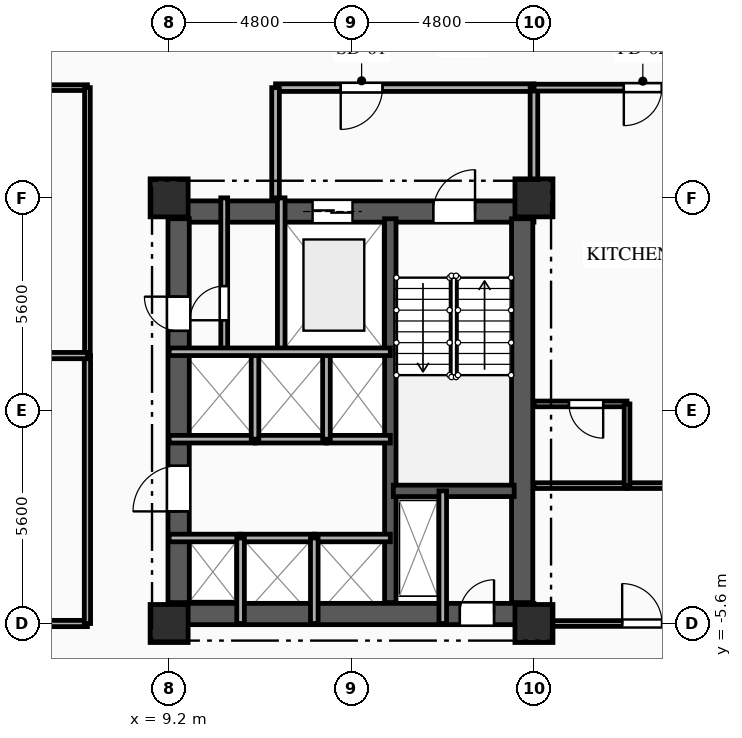
"""IFC4 building model, lengths in metres.
Left out: names, types, materials, properties, quantities, classifications, styles, units other than length and angle.
Written with IfcOpenShell. Run it as: python <this file> out.ifc"""

import sys

from ifc_helpers import new_model, si_unit, direction, frame, frame_2d, origin, origin_2d, place, context, subcontext, project, spatial, rectangle, extrude, element, fill, save


model = new_model("IFC4")
c1 = context("Model", 3, precision=1e-05, world=origin(), true_north=direction((0.0, 1.0)))
c2 = subcontext(c1, "Body", "Model", "MODEL_VIEW")
j1 = project(units=[si_unit("LENGTHUNIT", "METRE"), si_unit("PLANEANGLEUNIT", "RADIAN")], contexts=[c1])
p1 = place(None, origin())
s1 = spatial("IfcSite", under=j1, at=p1, CompositionType="ELEMENT")
p2 = place(p1, origin())
s2 = spatial("IfcBuilding", under=s1, at=p2, CompositionType="ELEMENT")
p3 = place(p2, frame((0.0, 0.0, 99.1)))
s3 = spatial("IfcBuildingStorey", under=s2, at=p3, CompositionType="ELEMENT", Elevation=99.1)
for number, where, z_axis, x_axis in (
    (1, (9.2, -5.6, 0.0), (0.0, 0.0, 1.0), (1.0, 0.0, 0.0)),
    (2, (9.2, 5.6, 0.0), (0.0, 0.0, 1.0), (1.0, 0.0, 0.0)),
    (3, (18.8, -5.6, 0.0), (0.0, 0.0, 1.0), (1.0, 0.0, 0.0)),
    (4, (18.8, 5.6, 0.0), (0.0, 0.0, 1.0), (1.0, 0.0, 0.0)),
):
    element("IfcColumn", number, at=place(p3, frame(where, z_axis=z_axis, x_axis=x_axis)), inside=s3, PredefinedType="COLUMN", context=c2, shape_type="SweptSolid", body=[
        extrude(rectangle(XDim=1.0, YDim=1.0, at=origin_2d()), origin(), (0.0, 0.0, 1.0), 3.35),
    ])
p4 = place(p3, frame((9.2, 5.24, 0.0), z_axis=(0.0, 0.0, 1.0), x_axis=(1.0, 0.0, 0.0)))
e5 = element("IfcWall", 5, at=p4, inside=s3, PredefinedType="SHEAR", context=c2, shape_type="SweptSolid", body=[
    extrude(rectangle(XDim=9.6, YDim=0.56, at=frame_2d((4.8, 0.0))), origin(), (0.0, 0.0, 1.0), 3.045),
])
p5 = place(p4, frame((6.95, 0.0, 0.0)))
e6 = element("IfcOpeningElement", 6, at=p5, cuts=e5, PredefinedType="OPENING", context=c2, shape_type="SweptSolid", body=[
    extrude(rectangle(XDim=1.1, YDim=2.15, at=frame_2d((0.55, 1.075))), frame((0.0, 0.29, 0.0), z_axis=(0.0, -1.0, 0.0), x_axis=(1.0, 0.0, 0.0)), (0.0, 0.0, 1.0), 0.58),
])
p6 = place(p4, frame((3.775, 0.0, 0.0)))
e7 = element("IfcOpeningElement", 7, at=p6, cuts=e5, PredefinedType="OPENING", context=c2, shape_type="SweptSolid", body=[
    extrude(rectangle(XDim=1.05, YDim=2.1, at=frame_2d((0.525, 1.05))), frame((0.0, 0.29, 0.0), z_axis=(0.0, -1.0, 0.0), x_axis=(1.0, 0.0, 0.0)), (0.0, 0.0, 1.0), 0.58),
])
p7 = place(p3, frame((9.2, -5.35, 0.0), z_axis=(0.0, 0.0, 1.0), x_axis=(1.0, 0.0, 0.0)))
e8 = element("IfcWall", 8, at=p7, inside=s3, PredefinedType="SHEAR", context=c2, shape_type="SweptSolid", body=[
    extrude(rectangle(XDim=9.6, YDim=0.56, at=frame_2d((4.8, 0.0))), origin(), (0.0, 0.0, 1.0), 3.045),
])
p8 = place(p7, frame((7.65, 0.0, 0.0)))
e9 = element("IfcOpeningElement", 9, at=p8, cuts=e8, PredefinedType="OPENING", context=c2, shape_type="SweptSolid", body=[
    extrude(rectangle(XDim=0.9, YDim=2.1, at=frame_2d((0.45, 1.05))), frame((0.0, 0.29, 0.0), z_axis=(0.0, -1.0, 0.0), x_axis=(1.0, 0.0, 0.0)), (0.0, 0.0, 1.0), 0.58),
])
p9 = place(p3, frame((9.45, -5.05, 0.0), z_axis=(0.0, 0.0, 1.0), x_axis=(0.0, 1.0, 0.0)))
e10 = element("IfcWall", 10, at=p9, inside=s3, PredefinedType="SHEAR", context=c2, shape_type="SweptSolid", body=[
    extrude(rectangle(XDim=10.1, YDim=0.56, at=frame_2d((5.05, 0.0))), origin(), (0.0, 0.0, 1.0), 3.045),
])
p10 = place(p9, frame((7.15, 0.0, 0.0)))
e11 = element("IfcOpeningElement", 11, at=p10, cuts=e10, PredefinedType="OPENING", context=c2, shape_type="SweptSolid", body=[
    extrude(rectangle(XDim=0.9, YDim=2.1, at=frame_2d((0.45, 1.05))), frame((0.0, 0.29, 0.0), z_axis=(0.0, -1.0, 0.0), x_axis=(1.0, 0.0, 0.0)), (0.0, 0.0, 1.0), 0.58),
])
p11 = place(p9, frame((2.4, 0.0, 0.0)))
e12 = element("IfcOpeningElement", 12, at=p11, cuts=e10, PredefinedType="OPENING", context=c2, shape_type="SweptSolid", body=[
    extrude(rectangle(XDim=1.2, YDim=2.15, at=frame_2d((0.6, 1.075))), frame((0.0, 0.29, 0.0), z_axis=(0.0, -1.0, 0.0), x_axis=(1.0, 0.0, 0.0)), (0.0, 0.0, 1.0), 0.58),
])
p12 = place(p3, frame((18.49, -5.05, 0.0), z_axis=(0.0, 0.0, 1.0), x_axis=(0.0, 1.0, 0.0)))
e13 = element("IfcWall", 13, at=p12, inside=s3, PredefinedType="SHEAR", context=c2, shape_type="SweptSolid", body=[
    extrude(rectangle(XDim=10.1, YDim=0.56, at=frame_2d((5.05, 0.0))), origin(), (0.0, 0.0, 1.0), 3.045),
])
p13 = place(p3, frame((15.02, -5.05, 0.0), z_axis=(0.0, 0.0, 1.0), x_axis=(0.0, 1.0, 0.0)))
e14 = element("IfcWall", 14, at=p13, inside=s3, PredefinedType="SHEAR", context=c2, shape_type="SweptSolid", body=[
    extrude(rectangle(XDim=10.1, YDim=0.3, at=frame_2d((5.05, 0.0))), origin(), (0.0, 0.0, 1.0), 3.045),
])
p14 = place(p3, frame((15.1, -2.11, 0.0), z_axis=(0.0, 0.0, 1.0), x_axis=(1.0, 0.0, 0.0)))
e15 = element("IfcWall", 15, at=p14, inside=s3, PredefinedType="SHEAR", context=c2, shape_type="SweptSolid", body=[
    extrude(rectangle(XDim=3.18, YDim=0.3, at=frame_2d((1.59, 0.0))), origin(), (0.0, 0.0, 1.0), 3.045),
])
p15 = place(p3, frame((16.4, -2.11, 0.0), z_axis=(0.0, 0.0, 1.0), x_axis=(0.0, -1.0, 0.0)))
e16 = element("IfcWall", 16, at=p15, inside=s3, PredefinedType="PARTITIONING", context=c2, shape_type="SweptSolid", body=[
    extrude(rectangle(XDim=3.49, YDim=0.2, at=frame_2d((1.745, 0.0))), origin(), (0.0, 0.0, 1.0), 3.045),
])
p16 = place(p3, frame((12.15, 5.6, 0.0), z_axis=(0.0, 0.0, 1.0), x_axis=(0.0, -1.0, 0.0)))
e17 = element("IfcWall", 17, at=p16, inside=s3, PredefinedType="PARTITIONING", context=c2, shape_type="SweptSolid", body=[
    extrude(rectangle(XDim=4.05, YDim=0.2, at=frame_2d((2.025, 0.0))), origin(), (0.0, 0.0, 1.0), 3.045),
])
p17 = place(p3, frame((18.8, 8.5, 0.0), z_axis=(0.0, 0.0, 1.0), x_axis=(-1.0, 0.0, 0.0)))
e18 = element("IfcWall", 18, at=p17, inside=s3, PredefinedType="PARTITIONING", context=c2, shape_type="SweptSolid", body=[
    extrude(rectangle(XDim=6.8, YDim=0.2, at=frame_2d((3.4, 0.0))), origin(), (0.0, 0.0, 1.0), 3.045),
])
p18 = place(p17, frame((3.985, 0.0, 0.0)))
e19 = element("IfcOpeningElement", 19, at=p18, cuts=e18, PredefinedType="OPENING", context=c2, shape_type="SweptSolid", body=[
    extrude(rectangle(XDim=1.1, YDim=2.15, at=frame_2d((0.55, 1.075))), frame((0.0, 0.11, 0.0), z_axis=(0.0, -1.0, 0.0), x_axis=(1.0, 0.0, 0.0)), (0.0, 0.0, 1.0), 0.22),
])
p19 = place(p3, frame((12.0, 8.5, 0.0), z_axis=(0.0, 0.0, 1.0), x_axis=(0.0, -1.0, 0.0)))
e20 = element("IfcWall", 20, at=p19, inside=s3, PredefinedType="PARTITIONING", context=c2, shape_type="SweptSolid", body=[
    extrude(rectangle(XDim=2.9, YDim=0.2, at=frame_2d((1.45, 0.0))), origin(), (0.0, 0.0, 1.0), 3.045),
])
p20 = place(p3, frame((18.8, 5.6, 0.0), z_axis=(0.0, 0.0, 1.0), x_axis=(0.0, 1.0, 0.0)))
e21 = element("IfcWall", 21, at=p20, inside=s3, PredefinedType="PARTITIONING", context=c2, shape_type="SweptSolid", body=[
    extrude(rectangle(XDim=2.9, YDim=0.2, at=frame_2d((1.45, 0.0))), origin(), (0.0, 0.0, 1.0), 2.53),
])
p21 = place(p3, frame((10.65, 1.55, 0.0), z_axis=(0.0, 0.0, 1.0), x_axis=(0.0, 1.0, 0.0)))
e22 = element("IfcWall", 22, at=p21, inside=s3, PredefinedType="PARTITIONING", context=c2, shape_type="SweptSolid", body=[
    extrude(rectangle(XDim=4.05, YDim=0.18, at=frame_2d((2.025, 0.0))), origin(), (0.0, 0.0, 1.0), 3.045),
])
p22 = place(p21, frame((0.829, 0.0, 0.0)))
e23 = element("IfcOpeningElement", 23, at=p22, cuts=e22, PredefinedType="OPENING", context=c2, shape_type="SweptSolid", body=[
    extrude(rectangle(XDim=0.9, YDim=2.1, at=frame_2d((0.45, 1.05))), frame((0.0, 0.1, 0.0), z_axis=(0.0, -1.0, 0.0), x_axis=(1.0, 0.0, 0.0)), (0.0, 0.0, 1.0), 0.2),
])
p23 = place(p3, frame((9.2, -3.35, 0.0), z_axis=(0.0, 0.0, 1.0), x_axis=(1.0, 0.0, 0.0)))
e24 = element("IfcWall", 24, at=p23, inside=s3, PredefinedType="PARTITIONING", context=c2, shape_type="SweptSolid", body=[
    extrude(rectangle(XDim=1.88, YDim=0.2, at=frame_2d((0.94, 0.0))), origin(), (0.0, 0.0, 1.0), 2.76),
])
p24 = place(p3, frame((11.08, -3.35, 0.0), z_axis=(0.0, 0.0, 1.0), x_axis=(1.0, 0.0, 0.0)))
e25 = element("IfcWall", 25, at=p24, inside=s3, PredefinedType="PARTITIONING", context=c2, shape_type="SweptSolid", body=[
    extrude(rectangle(XDim=1.94, YDim=0.2, at=frame_2d((0.97, 0.0))), origin(), (0.0, 0.0, 1.0), 3.045),
])
p25 = place(p3, frame((13.02, -3.35, 0.0), z_axis=(0.0, 0.0, 1.0), x_axis=(1.0, 0.0, 0.0)))
e26 = element("IfcWall", 26, at=p25, inside=s3, PredefinedType="PARTITIONING", context=c2, shape_type="SweptSolid", body=[
    extrude(rectangle(XDim=2.0, YDim=0.2, at=frame_2d((1.0, 0.0))), origin(), (0.0, 0.0, 1.0), 3.045),
])
p26 = place(p3, frame((11.46, -0.75, 0.0), z_axis=(0.0, 0.0, 1.0), x_axis=(-1.0, 0.0, 0.0)))
e27 = element("IfcWall", 27, at=p26, inside=s3, PredefinedType="PARTITIONING", context=c2, shape_type="SweptSolid", body=[
    extrude(rectangle(XDim=2.26, YDim=0.2, at=frame_2d((1.13, 0.0))), origin(), (0.0, 0.0, 1.0), 3.045),
])
p27 = place(p3, frame((13.34, -0.75, 0.0), z_axis=(0.0, 0.0, 1.0), x_axis=(-1.0, 0.0, 0.0)))
e28 = element("IfcWall", 28, at=p27, inside=s3, PredefinedType="PARTITIONING", context=c2, shape_type="SweptSolid", body=[
    extrude(rectangle(XDim=1.88, YDim=0.2, at=frame_2d((0.94, 0.0))), origin(), (0.0, 0.0, 1.0), 3.045),
])
p28 = place(p3, frame((15.02, -0.75, 0.0), z_axis=(0.0, 0.0, 1.0), x_axis=(-1.0, 0.0, 0.0)))
e29 = element("IfcWall", 29, at=p28, inside=s3, PredefinedType="PARTITIONING", context=c2, shape_type="SweptSolid", body=[
    extrude(rectangle(XDim=1.68, YDim=0.2, at=frame_2d((0.84, 0.0))), origin(), (0.0, 0.0, 1.0), 3.045),
])
for number, where, z_axis, x_axis in (
    (30, (11.08, -5.6, 0.0), (0.0, 0.0, 1.0), (0.0, 1.0, 0.0)),
    (31, (13.02, -5.6, 0.0), (0.0, 0.0, 1.0), (0.0, 1.0, 0.0)),
):
    element("IfcWall", number, at=place(p3, frame(where, z_axis=z_axis, x_axis=x_axis)), inside=s3, PredefinedType="PARTITIONING", context=c2, shape_type="SweptSolid", body=[
        extrude(rectangle(XDim=2.25, YDim=0.2, at=frame_2d((1.125, 0.0))), origin(), (0.0, 0.0, 1.0), 3.045),
    ])
for number, where, z_axis, x_axis in (
    (32, (11.46, -0.75, 0.0), (0.0, 0.0, 1.0), (0.0, 1.0, 0.0)),
    (33, (13.34, -0.75, 0.0), (0.0, 0.0, 1.0), (0.0, 1.0, 0.0)),
):
    element("IfcWall", number, at=place(p3, frame(where, z_axis=z_axis, x_axis=x_axis)), inside=s3, PredefinedType="PARTITIONING", context=c2, shape_type="SweptSolid", body=[
        extrude(rectangle(XDim=2.3, YDim=0.2, at=frame_2d((1.15, 0.0))), origin(), (0.0, 0.0, 1.0), 3.045),
    ])
p29 = place(p3, frame((23.0, 8.5, 0.0), z_axis=(0.0, 0.0, 1.0), x_axis=(-1.0, 0.0, 0.0)))
e34 = element("IfcWall", 34, at=p29, inside=s3, PredefinedType="PARTITIONING", context=c2, shape_type="SweptSolid", body=[
    extrude(rectangle(XDim=4.2, YDim=0.18, at=frame_2d((2.1, 0.0))), origin(), (0.0, 0.0, 1.0), 3.045),
])
p30 = place(p29, frame((0.835, 0.0, 0.0)))
e35 = element("IfcOpeningElement", 35, at=p30, cuts=e34, PredefinedType="OPENING", context=c2, shape_type="SweptSolid", body=[
    extrude(rectangle(XDim=1.0, YDim=2.15, at=frame_2d((0.5, 1.075))), frame((0.0, 0.1, 0.0), z_axis=(0.0, -1.0, 0.0), x_axis=(1.0, 0.0, 0.0)), (0.0, 0.0, 1.0), 0.2),
])
p31 = place(p3, frame((7.05, 8.5, 0.0), z_axis=(0.0, 0.0, 1.0), x_axis=(-1.0, 0.0, 0.0)))
e36 = element("IfcWall", 36, at=p31, inside=s3, PredefinedType="PARTITIONING", context=c2, shape_type="SweptSolid", body=[
    extrude(rectangle(XDim=7.05, YDim=0.15, at=frame_2d((3.525, 0.0))), origin(), (0.0, 0.0, 1.0), 3.045),
])
p32 = place(p3, frame((18.8, -5.6, 0.0), z_axis=(0.0, 0.0, 1.0), x_axis=(1.0, 0.0, 0.0)))
e37 = element("IfcWall", 37, at=p32, inside=s3, PredefinedType="PARTITIONING", context=c2, shape_type="SweptSolid", body=[
    extrude(rectangle(XDim=4.2, YDim=0.15, at=frame_2d((2.1, 0.0))), origin(), (0.0, 0.0, 1.0), 2.53),
])
p33 = place(p32, frame((2.321, 0.0, 0.0)))
e38 = element("IfcOpeningElement", 38, at=p33, cuts=e37, PredefinedType="OPENING", context=c2, shape_type="SweptSolid", body=[
    extrude(rectangle(XDim=1.05, YDim=2.15, at=frame_2d((0.525, 1.075))), frame((0.0, 0.085, 0.0), z_axis=(0.0, -1.0, 0.0), x_axis=(1.0, 0.0, 0.0)), (0.0, 0.0, 1.0), 0.17),
])
p34 = place(p3, frame((0.0, -5.6, 0.0), z_axis=(0.0, 0.0, 1.0), x_axis=(1.0, 0.0, 0.0)))
e39 = element("IfcWall", 39, at=p34, inside=s3, PredefinedType="PARTITIONING", context=c2, shape_type="SweptSolid", body=[
    extrude(rectangle(XDim=7.05, YDim=0.165, at=frame_2d((3.525, 0.0))), origin(), (0.0, 0.0, 1.0), 2.53),
])
p35 = place(p3, frame((7.05, -5.6, 0.0), z_axis=(0.0, 0.0, 1.0), x_axis=(0.0, 1.0, 0.0)))
e40 = element("IfcWall", 40, at=p35, inside=s3, PredefinedType="PARTITIONING", context=c2, shape_type="SweptSolid", body=[
    extrude(rectangle(XDim=7.05, YDim=0.165, at=frame_2d((3.525, 0.0))), origin(), (0.0, 0.0, 1.0), 3.045),
])
p36 = place(p3, frame((7.05, 1.45, 0.0), z_axis=(0.0, 0.0, 1.0), x_axis=(0.0, 1.0, 0.0)))
e41 = element("IfcWall", 41, at=p36, inside=s3, PredefinedType="PARTITIONING", context=c2, shape_type="SweptSolid", body=[
    extrude(rectangle(XDim=7.05, YDim=0.15, at=frame_2d((3.525, 0.0))), origin(), (0.0, 0.0, 1.0), 3.045),
])
p37 = place(p3, frame((21.25, -1.972, 0.0), z_axis=(0.0, 0.0, 1.0), x_axis=(1.0, 0.0, 0.0)))
e42 = element("IfcWall", 42, at=p37, inside=s3, PredefinedType="PARTITIONING", context=c2, shape_type="SweptSolid", body=[
    extrude(rectangle(XDim=4.586, YDim=0.15, at=frame_2d((2.293, 0.0))), origin(), (0.0, 0.0, 1.0), 3.045),
])
p38 = place(p3, frame((18.8, -1.972, 0.0), z_axis=(0.0, 0.0, 1.0), x_axis=(1.0, 0.0, 0.0)))
e43 = element("IfcWall", 43, at=p38, inside=s3, PredefinedType="PLUMBINGWALL", context=c2, shape_type="SweptSolid", body=[
    extrude(rectangle(XDim=2.45, YDim=0.15, at=frame_2d((1.225, 0.0))), origin(), (0.0, 0.0, 1.0), 2.53),
])
p39 = place(p3, frame((21.25, 0.178, 0.0), z_axis=(0.0, 0.0, 1.0), x_axis=(-1.0, 0.0, 0.0)))
e44 = element("IfcWall", 44, at=p39, inside=s3, PredefinedType="PLUMBINGWALL", context=c2, shape_type="SweptSolid", body=[
    extrude(rectangle(XDim=2.45, YDim=0.15, at=frame_2d((1.225, 0.0))), origin(), (0.0, 0.0, 1.0), 3.045),
])
p40 = place(p39, frame((0.629, 0.0, 0.0)))
e45 = element("IfcOpeningElement", 45, at=p40, cuts=e44, PredefinedType="OPENING", context=c2, shape_type="SweptSolid", body=[
    extrude(rectangle(XDim=0.9, YDim=2.1, at=frame_2d((0.45, 1.05))), frame((0.0, 0.085, 0.0), z_axis=(0.0, -1.0, 0.0), x_axis=(1.0, 0.0, 0.0)), (0.0, 0.0, 1.0), 0.17),
])
p41 = place(p3, frame((21.25, -1.972, 0.0), z_axis=(0.0, 0.0, 1.0), x_axis=(0.0, 1.0, 0.0)))
e46 = element("IfcWall", 46, at=p41, inside=s3, PredefinedType="PLUMBINGWALL", context=c2, shape_type="SweptSolid", body=[
    extrude(rectangle(XDim=2.15, YDim=0.15, at=frame_2d((1.075, 0.0))), origin(), (0.0, 0.0, 1.0), 3.045),
])
p42 = place(p3, frame((-7.05, 1.45, 0.0), z_axis=(0.0, 0.0, 1.0), x_axis=(1.0, 0.0, 0.0)))
e47 = element("IfcWall", 47, at=p42, inside=s3, PredefinedType="PARTITIONING", context=c2, shape_type="SweptSolid", body=[
    extrude(rectangle(XDim=14.1, YDim=0.165, at=frame_2d((7.05, 0.0))), origin(), (0.0, 0.0, 1.0), 3.045),
])
p43 = place(p3, frame((9.2, 1.55, 0.0), z_axis=(0.0, 0.0, 1.0), x_axis=(1.0, 0.0, 0.0)))
e48 = element("IfcWall", 48, at=p43, inside=s3, PredefinedType="PARTITIONING", context=c2, shape_type="SweptSolid", body=[
    extrude(rectangle(XDim=5.82, YDim=0.2, at=frame_2d((2.91, 0.0))), origin(), (0.0, 0.0, 1.0), 3.045),
])
p44 = place(p5, origin())
e49 = element("IfcDoor", 49, at=p44, inside=s3, OperationType="SINGLE_SWING_RIGHT", PredefinedType="DOOR", context=c2, shape_type="SweptSolid", body=[
    extrude(rectangle(XDim=1.1, YDim=2.15, at=frame_2d((0.55, 1.075))), frame((0.0, 0.025, 0.0), z_axis=(0.0, -1.0, 0.0), x_axis=(1.0, 0.0, 0.0)), (0.0, 0.0, 1.0), 0.05),
])
fill(e6, e49)
p45 = place(p6, origin())
e50 = element("IfcDoor", 50, at=p45, inside=s3, OperationType="DOUBLE_DOOR_SLIDING", PredefinedType="DOOR", context=c2, shape_type="SweptSolid", body=[
    extrude(rectangle(XDim=1.05, YDim=2.1, at=frame_2d((0.525, 1.05))), frame((0.0, 0.025, 0.0), z_axis=(0.0, -1.0, 0.0), x_axis=(1.0, 0.0, 0.0)), (0.0, 0.0, 1.0), 0.05),
])
fill(e7, e50)
p46 = place(p8, origin())
e51 = element("IfcDoor", 51, at=p46, inside=s3, OperationType="SINGLE_SWING_RIGHT", PredefinedType="DOOR", context=c2, shape_type="SweptSolid", body=[
    extrude(rectangle(XDim=0.9, YDim=2.1, at=frame_2d((0.45, 1.05))), frame((0.0, 0.025, 0.0), z_axis=(0.0, -1.0, 0.0), x_axis=(1.0, 0.0, 0.0)), (0.0, 0.0, 1.0), 0.05),
])
fill(e9, e51)
p47 = place(p18, origin())
e52 = element("IfcDoor", 52, at=p47, inside=s3, OperationType="SINGLE_SWING_RIGHT", PredefinedType="DOOR", context=c2, shape_type="SweptSolid", body=[
    extrude(rectangle(XDim=1.1, YDim=2.15, at=frame_2d((0.55, 1.075))), frame((0.0, 0.025, 0.0), z_axis=(0.0, -1.0, 0.0), x_axis=(1.0, 0.0, 0.0)), (0.0, 0.0, 1.0), 0.05),
])
fill(e19, e52)
p48 = place(p22, origin())
e53 = element("IfcDoor", 53, at=p48, inside=s3, OperationType="SINGLE_SWING_LEFT", PredefinedType="DOOR", context=c2, shape_type="SweptSolid", body=[
    extrude(rectangle(XDim=0.9, YDim=2.1, at=frame_2d((0.45, 1.05))), frame((0.0, 0.025, 0.0), z_axis=(0.0, -1.0, 0.0), x_axis=(1.0, 0.0, 0.0)), (0.0, 0.0, 1.0), 0.05),
])
fill(e23, e53)
p49 = place(p10, origin())
e54 = element("IfcDoor", 54, at=p49, inside=s3, OperationType="SINGLE_SWING_RIGHT", PredefinedType="DOOR", context=c2, shape_type="SweptSolid", body=[
    extrude(rectangle(XDim=0.9, YDim=2.1, at=frame_2d((0.45, 1.05))), frame((0.0, 0.025, 0.0), z_axis=(0.0, -1.0, 0.0), x_axis=(1.0, 0.0, 0.0)), (0.0, 0.0, 1.0), 0.05),
])
fill(e11, e54)
p50 = place(p11, origin())
e55 = element("IfcDoor", 55, at=p50, inside=s3, OperationType="SINGLE_SWING_LEFT", PredefinedType="DOOR", context=c2, shape_type="SweptSolid", body=[
    extrude(rectangle(XDim=1.2, YDim=2.15, at=frame_2d((0.6, 1.075))), frame((0.0, 0.025, 0.0), z_axis=(0.0, -1.0, 0.0), x_axis=(1.0, 0.0, 0.0)), (0.0, 0.0, 1.0), 0.05),
])
fill(e12, e55)
p51 = place(p30, origin())
e56 = element("IfcDoor", 56, at=p51, inside=s3, OperationType="SINGLE_SWING_RIGHT", PredefinedType="DOOR", context=c2, shape_type="SweptSolid", body=[
    extrude(rectangle(XDim=1.0, YDim=2.15, at=frame_2d((0.5, 1.075))), frame((0.0, 0.025, 0.0), z_axis=(0.0, -1.0, 0.0), x_axis=(1.0, 0.0, 0.0)), (0.0, 0.0, 1.0), 0.05),
])
fill(e35, e56)
p52 = place(p33, origin())
e57 = element("IfcDoor", 57, at=p52, inside=s3, OperationType="SINGLE_SWING_LEFT", PredefinedType="DOOR", context=c2, shape_type="SweptSolid", body=[
    extrude(rectangle(XDim=1.05, YDim=2.15, at=frame_2d((0.525, 1.075))), frame((0.0, 0.025, 0.0), z_axis=(0.0, -1.0, 0.0), x_axis=(1.0, 0.0, 0.0)), (0.0, 0.0, 1.0), 0.05),
])
fill(e38, e57)
p53 = place(p40, origin())
e58 = element("IfcDoor", 58, at=p53, inside=s3, OperationType="SINGLE_SWING_LEFT", PredefinedType="DOOR", context=c2, shape_type="SweptSolid", body=[
    extrude(rectangle(XDim=0.9, YDim=2.1, at=frame_2d((0.45, 1.05))), frame((0.0, 0.025, 0.0), z_axis=(0.0, -1.0, 0.0), x_axis=(1.0, 0.0, 0.0)), (0.0, 0.0, 1.0), 0.05),
])
fill(e45, e58)
save(model, sys.argv[1])
